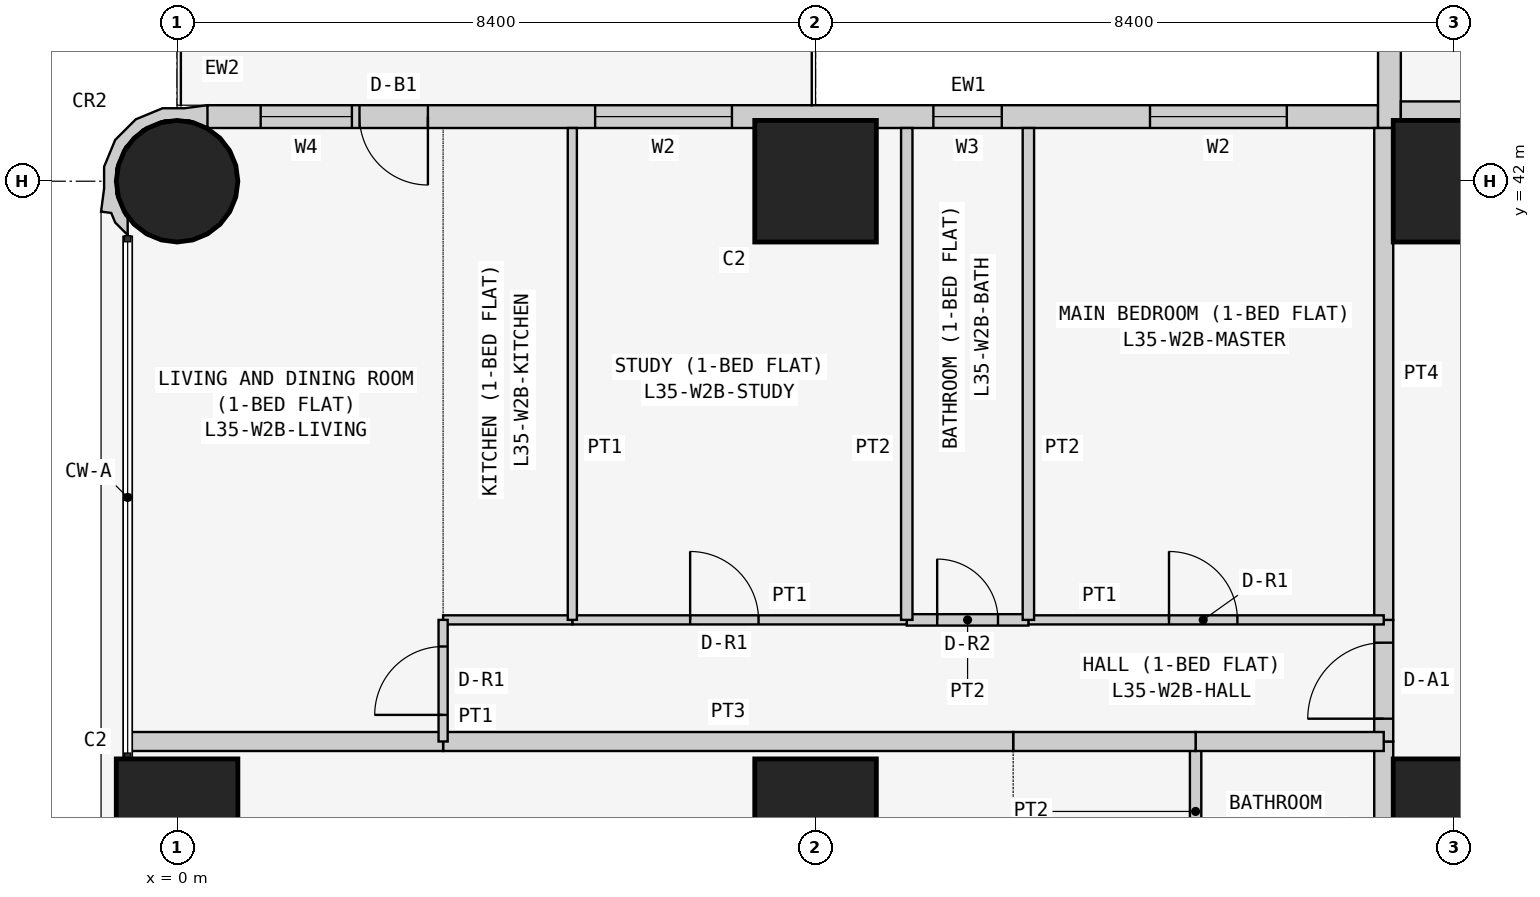
"""IFC4 building model, lengths in metres.
Left out: names, types, materials, properties, quantities, classifications, styles, units other than length and angle.
Written with IfcOpenShell. Run it as: python <this file> out.ifc"""

import sys

from ifc_helpers import new_model, si_unit, direction, frame, frame_2d, origin, origin_2d, place, context, subcontext, project, spatial, polyline, rectangle, circle, outline, extrude, element, fill, save


model = new_model("IFC4")
c1 = context("Model", 3, precision=1e-05, world=origin(), true_north=direction((0.0, 1.0)))
c2 = subcontext(c1, "Body", "Model", "MODEL_VIEW")
j1 = project(units=[si_unit("LENGTHUNIT", "METRE"), si_unit("PLANEANGLEUNIT", "RADIAN")], contexts=[c1])
p1 = place(None, origin())
s1 = spatial("IfcSite", under=j1, at=p1, CompositionType="ELEMENT")
p2 = place(p1, origin())
s2 = spatial("IfcBuilding", under=s1, at=p2, CompositionType="ELEMENT")
p3 = place(p2, frame((0.0, 0.0, 137.7)))
s3 = spatial("IfcBuildingStorey", under=s2, at=p3, CompositionType="ELEMENT", Elevation=137.7)
p4 = place(p3, frame((0.0, 33.6, 0.0), z_axis=(0.0, 0.0, 1.0), x_axis=(1.0, 0.0, 0.0)))
e1 = element("IfcColumn", 1, at=p4, inside=s3, PredefinedType="COLUMN", context=c2, shape_type="SweptSolid", body=[
    extrude(rectangle(XDim=1.6, YDim=1.6, at=origin_2d()), origin(), (0.0, 0.0, 1.0), 3.6),
])
p5 = place(p3, frame((0.0, 42.0, 0.0), z_axis=(0.0, 0.0, 1.0), x_axis=(1.0, 0.0, 0.0)))
e2 = element("IfcColumn", 2, at=p5, inside=s3, PredefinedType="COLUMN", context=c2, shape_type="SweptSolid", body=[
    extrude(circle(Radius=0.8, at=origin_2d()), origin(), (0.0, 0.0, 1.0), 3.6),
])
for number, where, z_axis, x_axis in (
    (3, (8.4, 33.6, 0.0), (0.0, 0.0, 1.0), (1.0, 0.0, 0.0)),
    (4, (8.4, 42.0, 0.0), (0.0, 0.0, 1.0), (1.0, 0.0, 0.0)),
    (5, (16.8, 33.6, 0.0), (0.0, 0.0, 1.0), (1.0, 0.0, 0.0)),
    (6, (16.8, 42.0, 0.0), (0.0, 0.0, 1.0), (1.0, 0.0, 0.0)),
):
    element("IfcColumn", number, at=place(p3, frame(where, z_axis=z_axis, x_axis=x_axis)), inside=s3, PredefinedType="COLUMN", context=c2, shape_type="SweptSolid", body=[
        extrude(rectangle(XDim=1.6, YDim=1.6, at=origin_2d()), origin(), (0.0, 0.0, 1.0), 3.6),
    ])
p6 = place(p3, frame((15.8, 42.85, 0.0), z_axis=(0.0, 0.0, 1.0), x_axis=(-1.0, 0.0, 0.0)))
e7 = element("IfcWall", 7, at=p6, inside=s3, PredefinedType="SOLIDWALL", context=c2, shape_type="SweptSolid", body=[
    extrude(rectangle(XDim=15.4, YDim=0.3, at=frame_2d((7.7, 0.0))), origin(), (0.0, 0.0, 1.0), 3.45),
])
p7 = place(p6, frame((1.2, 0.0, 0.9)))
e8 = element("IfcOpeningElement", 8, at=p7, cuts=e7, PredefinedType="OPENING", context=c2, shape_type="SweptSolid", body=[
    extrude(rectangle(XDim=1.8, YDim=1.5, at=frame_2d((0.9, 0.75))), frame((0.0, 0.16, 0.0), z_axis=(0.0, -1.0, 0.0), x_axis=(1.0, 0.0, 0.0)), (0.0, 0.0, 1.0), 0.32),
])
p8 = place(p6, frame((4.95, 0.0, 1.5)))
e9 = element("IfcOpeningElement", 9, at=p8, cuts=e7, PredefinedType="OPENING", context=c2, shape_type="SweptSolid", body=[
    extrude(rectangle(XDim=0.9, YDim=0.7, at=frame_2d((0.45, 0.35))), frame((0.0, 0.16, 0.0), z_axis=(0.0, -1.0, 0.0), x_axis=(1.0, 0.0, 0.0)), (0.0, 0.0, 1.0), 0.32),
])
p9 = place(p6, frame((8.5, 0.0, 0.9)))
e10 = element("IfcOpeningElement", 10, at=p9, cuts=e7, PredefinedType="OPENING", context=c2, shape_type="SweptSolid", body=[
    extrude(rectangle(XDim=1.8, YDim=1.5, at=frame_2d((0.9, 0.75))), frame((0.0, 0.16, 0.0), z_axis=(0.0, -1.0, 0.0), x_axis=(1.0, 0.0, 0.0)), (0.0, 0.0, 1.0), 0.32),
])
p10 = place(p6, frame((12.5, 0.0, 0.0)))
e11 = element("IfcOpeningElement", 11, at=p10, cuts=e7, PredefinedType="OPENING", context=c2, shape_type="SweptSolid", body=[
    extrude(rectangle(XDim=0.9, YDim=2.4, at=frame_2d((0.45, 1.2))), frame((0.0, 0.16, 0.0), z_axis=(0.0, -1.0, 0.0), x_axis=(1.0, 0.0, 0.0)), (0.0, 0.0, 1.0), 0.32),
])
p11 = place(p6, frame((13.5, 0.0, 0.9)))
e12 = element("IfcOpeningElement", 12, at=p11, cuts=e7, PredefinedType="OPENING", context=c2, shape_type="SweptSolid", body=[
    extrude(rectangle(XDim=1.2, YDim=1.5, at=frame_2d((0.6, 0.75))), frame((0.0, 0.16, 0.0), z_axis=(0.0, -1.0, 0.0), x_axis=(1.0, 0.0, 0.0)), (0.0, 0.0, 1.0), 0.32),
])
p12 = place(p3, frame((15.95, 50.0, 0.0), z_axis=(0.0, 0.0, 1.0), x_axis=(0.0, -1.0, 0.0)))
e13 = element("IfcWall", 13, at=p12, inside=s3, PredefinedType="SOLIDWALL", context=c2, shape_type="SweptSolid", body=[
    extrude(rectangle(XDim=7.3, YDim=0.3, at=frame_2d((3.65, 0.0))), origin(), (0.0, 0.0, 1.0), 3.45),
])
p13 = place(p12, frame((3.1, 0.0, 0.9)))
e14 = element("IfcOpeningElement", 14, at=p13, cuts=e13, PredefinedType="OPENING", context=c2, shape_type="SweptSolid", body=[
    extrude(rectangle(XDim=2.4, YDim=1.5, at=frame_2d((1.2, 0.75))), frame((0.0, 0.16, 0.0), z_axis=(0.0, -1.0, 0.0), x_axis=(1.0, 0.0, 0.0)), (0.0, 0.0, 1.0), 0.32),
])
p14 = place(p12, frame((0.75, 0.0, 0.9)))
e15 = element("IfcOpeningElement", 15, at=p14, cuts=e13, PredefinedType="OPENING", context=c2, shape_type="SweptSolid", body=[
    extrude(rectangle(XDim=1.2, YDim=1.5, at=frame_2d((0.6, 0.75))), frame((0.0, 0.16, 0.0), z_axis=(0.0, -1.0, 0.0), x_axis=(1.0, 0.0, 0.0)), (0.0, 0.0, 1.0), 0.32),
])
p15 = place(p3, frame((0.327, 42.817, 0.0), z_axis=(0.0, 0.0, 1.0), x_axis=(-0.93923434088, 0.343276641956, 0.0)))
e16 = element("IfcWall", 16, at=p15, inside=s3, PredefinedType="SOLIDWALL", context=c2, shape_type="SweptSolid", body=[
    extrude(outline(polyline([(-0.006, -0.197), (0.266, -0.055), (0.535, 0.044), (0.816, 0.302), (0.977, 0.648), (0.994, 1.03), (0.895, 1.299), (0.828, 1.598), (0.697, 1.569), (0.604, 1.67), (0.394, 1.767), (0.471, 1.556), (0.509, 1.539), (0.724, 1.304), (0.833, 1.005), (0.82, 0.687), (0.686, 0.397), (0.451, 0.182), (0.152, 0.073), (-0.116, 0.084), (-0.127, 0.078), (-0.146, 0.071), (-0.006, -0.197)])), origin(), (0.0, 0.0, 1.0), 3.45),
])
p16 = place(p3, frame((16.1, 42.925, 0.0), z_axis=(0.0, 0.0, 1.0), x_axis=(1.0, 0.0, 0.0)))
e17 = element("IfcWall", 17, at=p16, inside=s3, PredefinedType="PARTITIONING", context=c2, shape_type="SweptSolid", body=[
    extrude(rectangle(XDim=6.871, YDim=0.25, at=frame_2d((3.436, 0.0))), origin(), (0.0, 0.0, 1.0), 3.45),
])
p17 = place(p3, frame((15.875, 32.0, 0.0), z_axis=(0.0, 0.0, 1.0), x_axis=(0.0, 1.0, 0.0)))
e18 = element("IfcWall", 18, at=p17, inside=s3, PredefinedType="PARTITIONING", context=c2, shape_type="SweptSolid", body=[
    extrude(rectangle(XDim=2.629, YDim=0.25, at=frame_2d((1.314, 0.0))), origin(), (0.0, 0.0, 1.0), 3.45),
])
p18 = place(p3, frame((15.875, 34.629, 0.0), z_axis=(0.0, 0.0, 1.0), x_axis=(0.0, 1.0, 0.0)))
e19 = element("IfcWall", 19, at=p18, inside=s3, PredefinedType="PARTITIONING", context=c2, shape_type="SweptSolid", body=[
    extrude(rectangle(XDim=1.6, YDim=0.25, at=frame_2d((0.8, 0.0))), origin(), (0.0, 0.0, 1.0), 3.45),
])
p19 = place(p18, frame((0.3, 0.0, 0.0)))
e20 = element("IfcOpeningElement", 20, at=p19, cuts=e19, PredefinedType="OPENING", context=c2, shape_type="SweptSolid", body=[
    extrude(rectangle(XDim=1.0, YDim=2.1, at=frame_2d((0.5, 1.05))), frame((0.0, 0.135, 0.0), z_axis=(0.0, -1.0, 0.0), x_axis=(1.0, 0.0, 0.0)), (0.0, 0.0, 1.0), 0.27),
])
p20 = place(p3, frame((15.875, 36.229, 0.0), z_axis=(0.0, 0.0, 1.0), x_axis=(0.0, 1.0, 0.0)))
e21 = element("IfcWall", 21, at=p20, inside=s3, PredefinedType="PARTITIONING", context=c2, shape_type="SweptSolid", body=[
    extrude(rectangle(XDim=6.471, YDim=0.25, at=frame_2d((3.235, 0.0))), origin(), (0.0, 0.0, 1.0), 3.45),
])
p21 = place(p3, frame((13.4, 32.0, 0.0), z_axis=(0.0, 0.0, 1.0), x_axis=(0.0, 1.0, 0.0)))
e22 = element("IfcWall", 22, at=p21, inside=s3, PredefinedType="PARTITIONING", context=c2, shape_type="SweptSolid", body=[
    extrude(rectangle(XDim=2.629, YDim=0.15, at=frame_2d((1.314, 0.0))), origin(), (0.0, 0.0, 1.0), 3.45),
])
p22 = place(p3, frame((13.4, 34.629, 0.0), z_axis=(0.0, 0.0, 1.0), x_axis=(1.0, 0.0, 0.0)))
e23 = element("IfcWall", 23, at=p22, inside=s3, PredefinedType="PARTITIONING", context=c2, shape_type="SweptSolid", body=[
    extrude(rectangle(XDim=2.475, YDim=0.25, at=frame_2d((1.238, 0.0))), origin(), (0.0, 0.0, 1.0), 3.45),
])
p23 = place(p3, frame((11.0, 34.629, 0.0), z_axis=(0.0, 0.0, 1.0), x_axis=(1.0, 0.0, 0.0)))
e24 = element("IfcWall", 24, at=p23, inside=s3, PredefinedType="PARTITIONING", context=c2, shape_type="SweptSolid", body=[
    extrude(rectangle(XDim=2.4, YDim=0.25, at=frame_2d((1.2, 0.0))), origin(), (0.0, 0.0, 1.0), 3.45),
])
p24 = place(p3, frame((3.5, 34.629, 0.0), z_axis=(0.0, 0.0, 1.0), x_axis=(1.0, 0.0, 0.0)))
e25 = element("IfcWall", 25, at=p24, inside=s3, PredefinedType="PARTITIONING", context=c2, shape_type="SweptSolid", body=[
    extrude(rectangle(XDim=7.5, YDim=0.25, at=frame_2d((3.75, 0.0))), origin(), (0.0, 0.0, 1.0), 3.45),
])
p25 = place(p3, frame((-0.65, 34.629, 0.0), z_axis=(0.0, 0.0, 1.0), x_axis=(1.0, 0.0, 0.0)))
e26 = element("IfcWall", 26, at=p25, inside=s3, PredefinedType="PARTITIONING", context=c2, shape_type="SweptSolid", body=[
    extrude(rectangle(XDim=4.15, YDim=0.25, at=frame_2d((2.075, 0.0))), origin(), (0.0, 0.0, 1.0), 3.45),
])
p26 = place(p3, frame((11.2, 36.229, 0.0), z_axis=(0.0, 0.0, 1.0), x_axis=(1.0, 0.0, 0.0)))
e27 = element("IfcWall", 27, at=p26, inside=s3, PredefinedType="PARTITIONING", context=c2, shape_type="SweptSolid", body=[
    extrude(rectangle(XDim=4.675, YDim=0.12, at=frame_2d((2.337, 0.0))), origin(), (0.0, 0.0, 1.0), 3.45),
])
p27 = place(p26, frame((1.85, 0.0, 0.0)))
e28 = element("IfcOpeningElement", 28, at=p27, cuts=e27, PredefinedType="OPENING", context=c2, shape_type="SweptSolid", body=[
    extrude(rectangle(XDim=0.9, YDim=2.1, at=frame_2d((0.45, 1.05))), frame((0.0, 0.07, 0.0), z_axis=(0.0, -1.0, 0.0), x_axis=(1.0, 0.0, 0.0)), (0.0, 0.0, 1.0), 0.14),
])
p28 = place(p3, frame((9.6, 36.229, 0.0), z_axis=(0.0, 0.0, 1.0), x_axis=(1.0, 0.0, 0.0)))
e29 = element("IfcWall", 29, at=p28, inside=s3, PredefinedType="PARTITIONING", context=c2, shape_type="SweptSolid", body=[
    extrude(rectangle(XDim=1.6, YDim=0.15, at=frame_2d((0.8, 0.0))), origin(), (0.0, 0.0, 1.0), 3.45),
])
p29 = place(p28, frame((0.4, 0.0, 0.0)))
e30 = element("IfcOpeningElement", 30, at=p29, cuts=e29, PredefinedType="OPENING", context=c2, shape_type="SweptSolid", body=[
    extrude(rectangle(XDim=0.8, YDim=2.1, at=frame_2d((0.4, 1.05))), frame((0.0, 0.085, 0.0), z_axis=(0.0, -1.0, 0.0), x_axis=(1.0, 0.0, 0.0)), (0.0, 0.0, 1.0), 0.17),
])
p30 = place(p3, frame((5.2, 36.229, 0.0), z_axis=(0.0, 0.0, 1.0), x_axis=(1.0, 0.0, 0.0)))
e31 = element("IfcWall", 31, at=p30, inside=s3, PredefinedType="PARTITIONING", context=c2, shape_type="SweptSolid", body=[
    extrude(rectangle(XDim=4.4, YDim=0.12, at=frame_2d((2.2, 0.0))), origin(), (0.0, 0.0, 1.0), 3.45),
])
p31 = place(p30, frame((1.55, 0.0, 0.0)))
e32 = element("IfcOpeningElement", 32, at=p31, cuts=e31, PredefinedType="OPENING", context=c2, shape_type="SweptSolid", body=[
    extrude(rectangle(XDim=0.9, YDim=2.1, at=frame_2d((0.45, 1.05))), frame((0.0, 0.07, 0.0), z_axis=(0.0, -1.0, 0.0), x_axis=(1.0, 0.0, 0.0)), (0.0, 0.0, 1.0), 0.14),
])
p32 = place(p3, frame((3.5, 36.229, 0.0), z_axis=(0.0, 0.0, 1.0), x_axis=(1.0, 0.0, 0.0)))
e33 = element("IfcWall", 33, at=p32, inside=s3, PredefinedType="PARTITIONING", context=c2, shape_type="SweptSolid", body=[
    extrude(rectangle(XDim=1.7, YDim=0.12, at=frame_2d((0.85, 0.0))), origin(), (0.0, 0.0, 1.0), 3.45),
])
p33 = place(p3, frame((3.5, 34.629, 0.0), z_axis=(0.0, 0.0, 1.0), x_axis=(0.0, 1.0, 0.0)))
e34 = element("IfcWall", 34, at=p33, inside=s3, PredefinedType="PARTITIONING", context=c2, shape_type="SweptSolid", body=[
    extrude(rectangle(XDim=1.6, YDim=0.12, at=frame_2d((0.8, 0.0))), origin(), (0.0, 0.0, 1.0), 3.45),
])
p34 = place(p33, frame((0.35, 0.0, 0.0)))
e35 = element("IfcOpeningElement", 35, at=p34, cuts=e34, PredefinedType="OPENING", context=c2, shape_type="SweptSolid", body=[
    extrude(rectangle(XDim=0.9, YDim=2.1, at=frame_2d((0.45, 1.05))), frame((0.0, 0.07, 0.0), z_axis=(0.0, -1.0, 0.0), x_axis=(1.0, 0.0, 0.0)), (0.0, 0.0, 1.0), 0.14),
])
for number, where, z_axis, x_axis in (
    (36, (11.2, 36.229, 0.0), (0.0, 0.0, 1.0), (0.0, 1.0, 0.0)),
    (37, (9.6, 36.229, 0.0), (0.0, 0.0, 1.0), (0.0, 1.0, 0.0)),
):
    element("IfcWall", number, at=place(p3, frame(where, z_axis=z_axis, x_axis=x_axis)), inside=s3, PredefinedType="PARTITIONING", context=c2, shape_type="SweptSolid", body=[
        extrude(rectangle(XDim=6.471, YDim=0.15, at=frame_2d((3.235, 0.0))), origin(), (0.0, 0.0, 1.0), 3.45),
    ])
p35 = place(p3, frame((5.2, 36.229, 0.0), z_axis=(0.0, 0.0, 1.0), x_axis=(0.0, 1.0, 0.0)))
e38 = element("IfcWall", 38, at=p35, inside=s3, PredefinedType="PARTITIONING", context=c2, shape_type="SweptSolid", body=[
    extrude(rectangle(XDim=6.471, YDim=0.12, at=frame_2d((3.235, 0.0))), origin(), (0.0, 0.0, 1.0), 3.45),
])
p36 = place(p7, origin())
e39 = element("IfcWindow", 39, at=p36, inside=s3, PartitioningType="SINGLE_PANEL", PredefinedType="WINDOW", context=c2, shape_type="SweptSolid", body=[
    extrude(rectangle(XDim=1.8, YDim=1.5, at=frame_2d((0.9, 0.75))), frame((0.0, 0.03, 0.0), z_axis=(0.0, -1.0, 0.0), x_axis=(1.0, 0.0, 0.0)), (0.0, 0.0, 1.0), 0.06),
])
fill(e8, e39)
p37 = place(p8, origin())
e40 = element("IfcWindow", 40, at=p37, inside=s3, PartitioningType="SINGLE_PANEL", PredefinedType="WINDOW", context=c2, shape_type="SweptSolid", body=[
    extrude(rectangle(XDim=0.9, YDim=0.7, at=frame_2d((0.45, 0.35))), frame((0.0, 0.03, 0.0), z_axis=(0.0, -1.0, 0.0), x_axis=(1.0, 0.0, 0.0)), (0.0, 0.0, 1.0), 0.06),
])
fill(e9, e40)
p38 = place(p9, origin())
e41 = element("IfcWindow", 41, at=p38, inside=s3, PartitioningType="SINGLE_PANEL", PredefinedType="WINDOW", context=c2, shape_type="SweptSolid", body=[
    extrude(rectangle(XDim=1.8, YDim=1.5, at=frame_2d((0.9, 0.75))), frame((0.0, 0.03, 0.0), z_axis=(0.0, -1.0, 0.0), x_axis=(1.0, 0.0, 0.0)), (0.0, 0.0, 1.0), 0.06),
])
fill(e10, e41)
p39 = place(p10, origin())
e42 = element("IfcDoor", 42, at=p39, inside=s3, OperationType="SINGLE_SWING_LEFT", PredefinedType="DOOR", context=c2, shape_type="SweptSolid", body=[
    extrude(rectangle(XDim=0.9, YDim=2.4, at=frame_2d((0.45, 1.2))), frame((0.0, 0.025, 0.0), z_axis=(0.0, -1.0, 0.0), x_axis=(1.0, 0.0, 0.0)), (0.0, 0.0, 1.0), 0.05),
])
fill(e11, e42)
p40 = place(p11, origin())
e43 = element("IfcWindow", 43, at=p40, inside=s3, PartitioningType="SINGLE_PANEL", PredefinedType="WINDOW", context=c2, shape_type="SweptSolid", body=[
    extrude(rectangle(XDim=1.2, YDim=1.5, at=frame_2d((0.6, 0.75))), frame((0.0, 0.03, 0.0), z_axis=(0.0, -1.0, 0.0), x_axis=(1.0, 0.0, 0.0)), (0.0, 0.0, 1.0), 0.06),
])
fill(e12, e43)
p41 = place(p19, origin())
e44 = element("IfcDoor", 44, at=p41, inside=s3, OperationType="SINGLE_SWING_LEFT", PredefinedType="DOOR", context=c2, shape_type="SweptSolid", body=[
    extrude(rectangle(XDim=1.0, YDim=2.1, at=frame_2d((0.5, 1.05))), frame((0.0, 0.025, 0.0), z_axis=(0.0, -1.0, 0.0), x_axis=(1.0, 0.0, 0.0)), (0.0, 0.0, 1.0), 0.05),
])
fill(e20, e44)
p42 = place(p27, origin())
e45 = element("IfcDoor", 45, at=p42, inside=s3, OperationType="SINGLE_SWING_LEFT", PredefinedType="DOOR", context=c2, shape_type="SweptSolid", body=[
    extrude(rectangle(XDim=0.9, YDim=2.1, at=frame_2d((0.45, 1.05))), frame((0.0, 0.025, 0.0), z_axis=(0.0, -1.0, 0.0), x_axis=(1.0, 0.0, 0.0)), (0.0, 0.0, 1.0), 0.05),
])
fill(e28, e45)
p43 = place(p29, origin())
e46 = element("IfcDoor", 46, at=p43, inside=s3, OperationType="SINGLE_SWING_LEFT", PredefinedType="DOOR", context=c2, shape_type="SweptSolid", body=[
    extrude(rectangle(XDim=0.8, YDim=2.1, at=frame_2d((0.4, 1.05))), frame((0.0, 0.025, 0.0), z_axis=(0.0, -1.0, 0.0), x_axis=(1.0, 0.0, 0.0)), (0.0, 0.0, 1.0), 0.05),
])
fill(e30, e46)
p44 = place(p31, origin())
e47 = element("IfcDoor", 47, at=p44, inside=s3, OperationType="SINGLE_SWING_LEFT", PredefinedType="DOOR", context=c2, shape_type="SweptSolid", body=[
    extrude(rectangle(XDim=0.9, YDim=2.1, at=frame_2d((0.45, 1.05))), frame((0.0, 0.025, 0.0), z_axis=(0.0, -1.0, 0.0), x_axis=(1.0, 0.0, 0.0)), (0.0, 0.0, 1.0), 0.05),
])
fill(e32, e47)
p45 = place(p34, origin())
e48 = element("IfcDoor", 48, at=p45, inside=s3, OperationType="SINGLE_SWING_LEFT", PredefinedType="DOOR", context=c2, shape_type="SweptSolid", body=[
    extrude(rectangle(XDim=0.9, YDim=2.1, at=frame_2d((0.45, 1.05))), frame((0.0, 0.025, 0.0), z_axis=(0.0, -1.0, 0.0), x_axis=(1.0, 0.0, 0.0)), (0.0, 0.0, 1.0), 0.05),
])
fill(e35, e48)
save(model, sys.argv[1])
